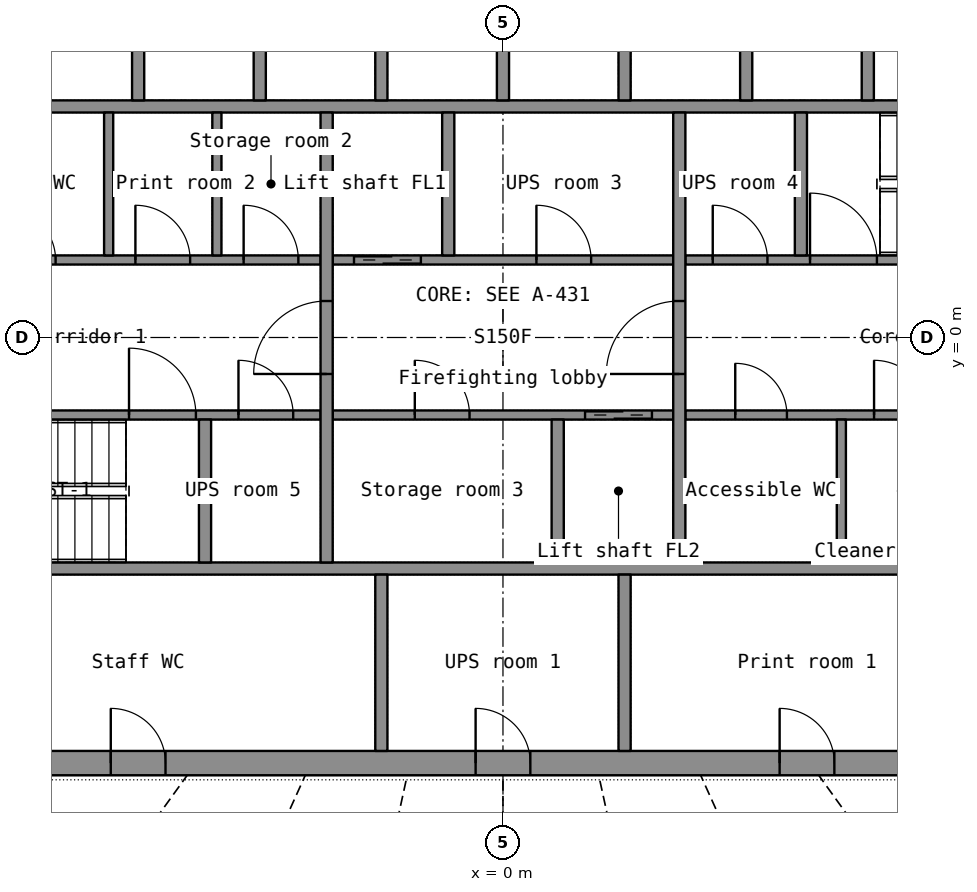
"""IFC4 building model, lengths in metres.
Left out: names, types, materials, properties, quantities, classifications, styles, units other than length and angle.
Written with IfcOpenShell. Run it as: python <this file> out.ifc"""

import sys

from ifc_helpers import new_model, si_unit, direction, frame, frame_2d, origin, place, context, subcontext, project, spatial, rectangle, extrude, element, fill, save


model = new_model("IFC4")
c1 = context("Model", 3, precision=1e-05, world=origin(), true_north=direction((0.0, 1.0)))
c2 = subcontext(c1, "Body", "Model", "MODEL_VIEW")
j1 = project(units=[si_unit("LENGTHUNIT", "METRE"), si_unit("PLANEANGLEUNIT", "RADIAN")], contexts=[c1])
p1 = place(None, origin())
s1 = spatial("IfcSite", under=j1, at=p1, CompositionType="ELEMENT")
p2 = place(p1, origin())
s2 = spatial("IfcBuilding", under=s1, at=p2, CompositionType="ELEMENT")
p3 = place(p2, frame((0.0, 0.0, 239.3)))
s3 = spatial("IfcBuildingStorey", under=s2, at=p3, CompositionType="ELEMENT", Elevation=239.3)
p4 = place(p3, frame((-11.6, -7.0, 0.0), z_axis=(0.0, 0.0, 1.0), x_axis=(1.0, 0.0, 0.0)))
e1 = element("IfcWall", 1, at=p4, inside=s3, PredefinedType="SHEAR", context=c2, shape_type="SweptSolid", body=[
    extrude(rectangle(XDim=23.2, YDim=0.4, at=frame_2d((11.6, 0.0))), origin(), (0.0, 0.0, 1.0), 3.3),
])
p5 = place(p4, frame((20.05, 0.0, 0.0)))
e2 = element("IfcOpeningElement", 2, at=p5, cuts=e1, PredefinedType="OPENING", context=c2, shape_type="SweptSolid", body=[
    extrude(rectangle(XDim=1.1, YDim=2.2, at=frame_2d((0.55, 1.1))), frame((0.0, 0.21, 0.0), z_axis=(0.0, -1.0, 0.0), x_axis=(1.0, 0.0, 0.0)), (0.0, 0.0, 1.0), 0.42),
])
p6 = place(p4, frame((5.15, 0.0, 0.0)))
e3 = element("IfcOpeningElement", 3, at=p6, cuts=e1, PredefinedType="OPENING", context=c2, shape_type="SweptSolid", body=[
    extrude(rectangle(XDim=0.9, YDim=2.1, at=frame_2d((0.45, 1.05))), frame((0.0, 0.21, 0.0), z_axis=(0.0, -1.0, 0.0), x_axis=(1.0, 0.0, 0.0)), (0.0, 0.0, 1.0), 0.42),
])
p7 = place(p4, frame((11.15, 0.0, 0.0)))
e4 = element("IfcOpeningElement", 4, at=p7, cuts=e1, PredefinedType="OPENING", context=c2, shape_type="SweptSolid", body=[
    extrude(rectangle(XDim=0.9, YDim=2.1, at=frame_2d((0.45, 1.05))), frame((0.0, 0.21, 0.0), z_axis=(0.0, -1.0, 0.0), x_axis=(1.0, 0.0, 0.0)), (0.0, 0.0, 1.0), 0.42),
])
p8 = place(p4, frame((16.15, 0.0, 0.0)))
e5 = element("IfcOpeningElement", 5, at=p8, cuts=e1, PredefinedType="OPENING", context=c2, shape_type="SweptSolid", body=[
    extrude(rectangle(XDim=0.9, YDim=2.1, at=frame_2d((0.45, 1.05))), frame((0.0, 0.21, 0.0), z_axis=(0.0, -1.0, 0.0), x_axis=(1.0, 0.0, 0.0)), (0.0, 0.0, 1.0), 0.42),
])
p9 = place(p4, frame((0.35, 0.0, 0.0)))
e6 = element("IfcOpeningElement", 6, at=p9, cuts=e1, PredefinedType="OPENING", context=c2, shape_type="SweptSolid", body=[
    extrude(rectangle(XDim=0.8, YDim=2.05, at=frame_2d((0.4, 1.025))), frame((0.0, 0.21, 0.0), z_axis=(0.0, -1.0, 0.0), x_axis=(1.0, 0.0, 0.0)), (0.0, 0.0, 1.0), 0.42),
])
p10 = place(p4, frame((22.05, 0.0, 0.0)))
e7 = element("IfcOpeningElement", 7, at=p10, cuts=e1, PredefinedType="OPENING", context=c2, shape_type="SweptSolid", body=[
    extrude(rectangle(XDim=0.8, YDim=2.05, at=frame_2d((0.4, 1.025))), frame((0.0, 0.21, 0.0), z_axis=(0.0, -1.0, 0.0), x_axis=(1.0, 0.0, 0.0)), (0.0, 0.0, 1.0), 0.42),
])
for number, where, z_axis, x_axis in (
    (8, (-11.6, -3.8, 0.0), (0.0, 0.0, 1.0), (1.0, 0.0, 0.0)),
    (9, (-11.6, 3.8, 0.0), (0.0, 0.0, 1.0), (1.0, 0.0, 0.0)),
):
    element("IfcWall", number, at=place(p3, frame(where, z_axis=z_axis, x_axis=x_axis)), inside=s3, PredefinedType="SHEAR", context=c2, shape_type="SweptSolid", body=[
        extrude(rectangle(XDim=23.2, YDim=0.2, at=frame_2d((11.6, 0.0))), origin(), (0.0, 0.0, 1.0), 3.3),
    ])
for number, where, z_axis, x_axis in (
    (10, (-2.0, -6.8, 0.0), (0.0, 0.0, 1.0), (0.0, 1.0, 0.0)),
    (11, (2.0, -6.8, 0.0), (0.0, 0.0, 1.0), (0.0, 1.0, 0.0)),
):
    element("IfcWall", number, at=place(p3, frame(where, z_axis=z_axis, x_axis=x_axis)), inside=s3, PredefinedType="PARTITIONING", context=c2, shape_type="SweptSolid", body=[
        extrude(rectangle(XDim=2.9, YDim=0.2, at=frame_2d((1.45, 0.0))), origin(), (0.0, 0.0, 1.0), 3.3),
    ])
for number, where, z_axis, x_axis in (
    (12, (-6.0, 3.9, 0.0), (0.0, 0.0, 1.0), (0.0, 1.0, 0.0)),
    (13, (-4.0, 3.9, 0.0), (0.0, 0.0, 1.0), (0.0, 1.0, 0.0)),
    (14, (-2.0, 3.9, 0.0), (0.0, 0.0, 1.0), (0.0, 1.0, 0.0)),
    (15, (0.0, 3.9, 0.0), (0.0, 0.0, 1.0), (0.0, 1.0, 0.0)),
    (16, (2.0, 3.9, 0.0), (0.0, 0.0, 1.0), (0.0, 1.0, 0.0)),
    (17, (4.0, 3.9, 0.0), (0.0, 0.0, 1.0), (0.0, 1.0, 0.0)),
    (18, (6.0, 3.9, 0.0), (0.0, 0.0, 1.0), (0.0, 1.0, 0.0)),
):
    element("IfcWall", number, at=place(p3, frame(where, z_axis=z_axis, x_axis=x_axis)), inside=s3, PredefinedType="SHEAR", context=c2, shape_type="SweptSolid", body=[
        extrude(rectangle(XDim=2.9, YDim=0.2, at=frame_2d((1.45, 0.0))), origin(), (0.0, 0.0, 1.0), 3.3),
    ])
p11 = place(p3, frame((-11.6, -1.275, 0.0), z_axis=(0.0, 0.0, 1.0), x_axis=(1.0, 0.0, 0.0)))
e19 = element("IfcWall", 19, at=p11, inside=s3, PredefinedType="SHEAR", context=c2, shape_type="SweptSolid", body=[
    extrude(rectangle(XDim=8.6, YDim=0.15, at=frame_2d((4.3, 0.0))), origin(), (0.0, 0.0, 1.0), 3.3),
])
p12 = place(p11, frame((5.45, 0.0, 0.0)))
e20 = element("IfcOpeningElement", 20, at=p12, cuts=e19, PredefinedType="OPENING", context=c2, shape_type="SweptSolid", body=[
    extrude(rectangle(XDim=1.1, YDim=2.15, at=frame_2d((0.55, 1.075))), frame((0.0, 0.085, 0.0), z_axis=(0.0, -1.0, 0.0), x_axis=(1.0, 0.0, 0.0)), (0.0, 0.0, 1.0), 0.17),
])
p13 = place(p11, frame((7.25, 0.0, 0.0)))
e21 = element("IfcOpeningElement", 21, at=p13, cuts=e19, PredefinedType="OPENING", context=c2, shape_type="SweptSolid", body=[
    extrude(rectangle(XDim=0.9, YDim=2.1, at=frame_2d((0.45, 1.05))), frame((0.0, 0.085, 0.0), z_axis=(0.0, -1.0, 0.0), x_axis=(1.0, 0.0, 0.0)), (0.0, 0.0, 1.0), 0.17),
])
p14 = place(p3, frame((-2.8, -1.275, 0.0), z_axis=(0.0, 0.0, 1.0), x_axis=(1.0, 0.0, 0.0)))
e22 = element("IfcWall", 22, at=p14, inside=s3, PredefinedType="SHEAR", context=c2, shape_type="SweptSolid", body=[
    extrude(rectangle(XDim=5.6, YDim=0.15, at=frame_2d((2.8, 0.0))), origin(), (0.0, 0.0, 1.0), 3.3),
])
p15 = place(p14, frame((4.15, 0.0, 0.0)))
e23 = element("IfcOpeningElement", 23, at=p15, cuts=e22, PredefinedType="OPENING", context=c2, shape_type="SweptSolid", body=[
    extrude(rectangle(XDim=1.1, YDim=2.2, at=frame_2d((0.55, 1.1))), frame((0.0, 0.085, 0.0), z_axis=(0.0, -1.0, 0.0), x_axis=(1.0, 0.0, 0.0)), (0.0, 0.0, 1.0), 0.17),
])
p16 = place(p14, frame((1.35, 0.0, 0.0)))
e24 = element("IfcOpeningElement", 24, at=p16, cuts=e22, PredefinedType="OPENING", context=c2, shape_type="SweptSolid", body=[
    extrude(rectangle(XDim=0.9, YDim=2.1, at=frame_2d((0.45, 1.05))), frame((0.0, 0.085, 0.0), z_axis=(0.0, -1.0, 0.0), x_axis=(1.0, 0.0, 0.0)), (0.0, 0.0, 1.0), 0.17),
])
p17 = place(p3, frame((3.0, -1.275, 0.0), z_axis=(0.0, 0.0, 1.0), x_axis=(1.0, 0.0, 0.0)))
e25 = element("IfcWall", 25, at=p17, inside=s3, PredefinedType="PARTITIONING", context=c2, shape_type="SweptSolid", body=[
    extrude(rectangle(XDim=8.6, YDim=0.15, at=frame_2d((4.3, 0.0))), origin(), (0.0, 0.0, 1.0), 3.3),
])
p18 = place(p17, frame((0.82, 0.0, 0.0)))
e26 = element("IfcOpeningElement", 26, at=p18, cuts=e25, PredefinedType="OPENING", context=c2, shape_type="SweptSolid", body=[
    extrude(rectangle(XDim=0.85, YDim=2.1, at=frame_2d((0.425, 1.05))), frame((0.0, 0.085, 0.0), z_axis=(0.0, -1.0, 0.0), x_axis=(1.0, 0.0, 0.0)), (0.0, 0.0, 1.0), 0.17),
])
p19 = place(p17, frame((3.103, 0.0, 0.0)))
e27 = element("IfcOpeningElement", 27, at=p19, cuts=e25, PredefinedType="OPENING", context=c2, shape_type="SweptSolid", body=[
    extrude(rectangle(XDim=0.9, YDim=2.1, at=frame_2d((0.45, 1.05))), frame((0.0, 0.085, 0.0), z_axis=(0.0, -1.0, 0.0), x_axis=(1.0, 0.0, 0.0)), (0.0, 0.0, 1.0), 0.17),
])
p20 = place(p17, frame((6.158, 0.0, 0.0)))
e28 = element("IfcOpeningElement", 28, at=p20, cuts=e25, PredefinedType="OPENING", context=c2, shape_type="SweptSolid", body=[
    extrude(rectangle(XDim=0.9, YDim=2.1, at=frame_2d((0.45, 1.05))), frame((0.0, 0.085, 0.0), z_axis=(0.0, -1.0, 0.0), x_axis=(1.0, 0.0, 0.0)), (0.0, 0.0, 1.0), 0.17),
])
p21 = place(p3, frame((-11.6, 1.275, 0.0), z_axis=(0.0, 0.0, 1.0), x_axis=(1.0, 0.0, 0.0)))
e29 = element("IfcWall", 29, at=p21, inside=s3, PredefinedType="PARTITIONING", context=c2, shape_type="SweptSolid", body=[
    extrude(rectangle(XDim=8.6, YDim=0.15, at=frame_2d((4.3, 0.0))), origin(), (0.0, 0.0, 1.0), 3.3),
])
p22 = place(p21, frame((0.798, 0.0, 0.0)))
e30 = element("IfcOpeningElement", 30, at=p22, cuts=e29, PredefinedType="OPENING", context=c2, shape_type="SweptSolid", body=[
    extrude(rectangle(XDim=0.85, YDim=2.1, at=frame_2d((0.425, 1.05))), frame((0.0, 0.085, 0.0), z_axis=(0.0, -1.0, 0.0), x_axis=(1.0, 0.0, 0.0)), (0.0, 0.0, 1.0), 0.17),
])
p23 = place(p21, frame((3.393, 0.0, 0.0)))
e31 = element("IfcOpeningElement", 31, at=p23, cuts=e29, PredefinedType="OPENING", context=c2, shape_type="SweptSolid", body=[
    extrude(rectangle(XDim=0.85, YDim=2.1, at=frame_2d((0.425, 1.05))), frame((0.0, 0.085, 0.0), z_axis=(0.0, -1.0, 0.0), x_axis=(1.0, 0.0, 0.0)), (0.0, 0.0, 1.0), 0.17),
])
p24 = place(p21, frame((5.555, 0.0, 0.0)))
e32 = element("IfcOpeningElement", 32, at=p24, cuts=e29, PredefinedType="OPENING", context=c2, shape_type="SweptSolid", body=[
    extrude(rectangle(XDim=0.9, YDim=2.1, at=frame_2d((0.45, 1.05))), frame((0.0, 0.085, 0.0), z_axis=(0.0, -1.0, 0.0), x_axis=(1.0, 0.0, 0.0)), (0.0, 0.0, 1.0), 0.17),
])
p25 = place(p21, frame((7.335, 0.0, 0.0)))
e33 = element("IfcOpeningElement", 33, at=p25, cuts=e29, PredefinedType="OPENING", context=c2, shape_type="SweptSolid", body=[
    extrude(rectangle(XDim=0.9, YDim=2.1, at=frame_2d((0.45, 1.05))), frame((0.0, 0.085, 0.0), z_axis=(0.0, -1.0, 0.0), x_axis=(1.0, 0.0, 0.0)), (0.0, 0.0, 1.0), 0.17),
])
p26 = place(p3, frame((-2.8, 1.275, 0.0), z_axis=(0.0, 0.0, 1.0), x_axis=(1.0, 0.0, 0.0)))
e34 = element("IfcWall", 34, at=p26, inside=s3, PredefinedType="SHEAR", context=c2, shape_type="SweptSolid", body=[
    extrude(rectangle(XDim=5.6, YDim=0.15, at=frame_2d((2.8, 0.0))), origin(), (0.0, 0.0, 1.0), 3.3),
])
p27 = place(p26, frame((0.35, 0.0, 0.0)))
e35 = element("IfcOpeningElement", 35, at=p27, cuts=e34, PredefinedType="OPENING", context=c2, shape_type="SweptSolid", body=[
    extrude(rectangle(XDim=1.1, YDim=2.2, at=frame_2d((0.55, 1.1))), frame((0.0, 0.085, 0.0), z_axis=(0.0, -1.0, 0.0), x_axis=(1.0, 0.0, 0.0)), (0.0, 0.0, 1.0), 0.17),
])
p28 = place(p26, frame((3.35, 0.0, 0.0)))
e36 = element("IfcOpeningElement", 36, at=p28, cuts=e34, PredefinedType="OPENING", context=c2, shape_type="SweptSolid", body=[
    extrude(rectangle(XDim=0.9, YDim=2.1, at=frame_2d((0.45, 1.05))), frame((0.0, 0.085, 0.0), z_axis=(0.0, -1.0, 0.0), x_axis=(1.0, 0.0, 0.0)), (0.0, 0.0, 1.0), 0.17),
])
p29 = place(p3, frame((3.0, 1.275, 0.0), z_axis=(0.0, 0.0, 1.0), x_axis=(1.0, 0.0, 0.0)))
e37 = element("IfcWall", 37, at=p29, inside=s3, PredefinedType="SHEAR", context=c2, shape_type="SweptSolid", body=[
    extrude(rectangle(XDim=8.6, YDim=0.15, at=frame_2d((4.3, 0.0))), origin(), (0.0, 0.0, 1.0), 3.3),
])
p30 = place(p29, frame((2.05, 0.0, 0.0)))
e38 = element("IfcOpeningElement", 38, at=p30, cuts=e37, PredefinedType="OPENING", context=c2, shape_type="SweptSolid", body=[
    extrude(rectangle(XDim=1.1, YDim=2.15, at=frame_2d((0.55, 1.075))), frame((0.0, 0.085, 0.0), z_axis=(0.0, -1.0, 0.0), x_axis=(1.0, 0.0, 0.0)), (0.0, 0.0, 1.0), 0.17),
])
p31 = place(p29, frame((0.45, 0.0, 0.0)))
e39 = element("IfcOpeningElement", 39, at=p31, cuts=e37, PredefinedType="OPENING", context=c2, shape_type="SweptSolid", body=[
    extrude(rectangle(XDim=0.9, YDim=2.1, at=frame_2d((0.45, 1.05))), frame((0.0, 0.085, 0.0), z_axis=(0.0, -1.0, 0.0), x_axis=(1.0, 0.0, 0.0)), (0.0, 0.0, 1.0), 0.17),
])
p32 = place(p3, frame((-2.9, -3.7, 0.0), z_axis=(0.0, 0.0, 1.0), x_axis=(0.0, 1.0, 0.0)))
e40 = element("IfcWall", 40, at=p32, inside=s3, PredefinedType="SHEAR", context=c2, shape_type="SweptSolid", body=[
    extrude(rectangle(XDim=7.4, YDim=0.2, at=frame_2d((3.7, 0.0))), origin(), (0.0, 0.0, 1.0), 3.3),
])
p33 = place(p32, frame((3.1, 0.0, 0.0)))
e41 = element("IfcOpeningElement", 41, at=p33, cuts=e40, PredefinedType="OPENING", context=c2, shape_type="SweptSolid", body=[
    extrude(rectangle(XDim=1.2, YDim=2.2, at=frame_2d((0.6, 1.1))), frame((0.0, 0.11, 0.0), z_axis=(0.0, -1.0, 0.0), x_axis=(1.0, 0.0, 0.0)), (0.0, 0.0, 1.0), 0.22),
])
p34 = place(p3, frame((2.9, -3.7, 0.0), z_axis=(0.0, 0.0, 1.0), x_axis=(0.0, 1.0, 0.0)))
e42 = element("IfcWall", 42, at=p34, inside=s3, PredefinedType="SHEAR", context=c2, shape_type="SweptSolid", body=[
    extrude(rectangle(XDim=7.4, YDim=0.2, at=frame_2d((3.7, 0.0))), origin(), (0.0, 0.0, 1.0), 3.3),
])
p35 = place(p34, frame((3.1, 0.0, 0.0)))
e43 = element("IfcOpeningElement", 43, at=p35, cuts=e42, PredefinedType="OPENING", context=c2, shape_type="SweptSolid", body=[
    extrude(rectangle(XDim=1.2, YDim=2.2, at=frame_2d((0.6, 1.1))), frame((0.0, 0.11, 0.0), z_axis=(0.0, -1.0, 0.0), x_axis=(1.0, 0.0, 0.0)), (0.0, 0.0, 1.0), 0.22),
])
for number, where, z_axis, x_axis in (
    (44, (-0.9, 1.35, 0.0), (0.0, 0.0, 1.0), (0.0, 1.0, 0.0)),
    (45, (0.9, -3.7, 0.0), (0.0, 0.0, 1.0), (0.0, 1.0, 0.0)),
    (46, (-4.9, -3.7, 0.0), (0.0, 0.0, 1.0), (0.0, 1.0, 0.0)),
    (47, (4.9, 1.35, 0.0), (0.0, 0.0, 1.0), (0.0, 1.0, 0.0)),
):
    element("IfcWall", number, at=place(p3, frame(where, z_axis=z_axis, x_axis=x_axis)), inside=s3, PredefinedType="SHEAR", context=c2, shape_type="SweptSolid", body=[
        extrude(rectangle(XDim=2.35, YDim=0.2, at=frame_2d((1.175, 0.0))), origin(), (0.0, 0.0, 1.0), 3.3),
    ])
for number, where, z_axis, x_axis in (
    (48, (-6.485, 1.35, 0.0), (0.0, 0.0, 1.0), (0.0, 1.0, 0.0)),
    (49, (-4.705, 1.35, 0.0), (0.0, 0.0, 1.0), (0.0, 1.0, 0.0)),
    (50, (5.565, -3.7, 0.0), (0.0, 0.0, 1.0), (0.0, 1.0, 0.0)),
):
    element("IfcWall", number, at=place(p3, frame(where, z_axis=z_axis, x_axis=x_axis)), inside=s3, PredefinedType="PARTITIONING", context=c2, shape_type="SweptSolid", body=[
        extrude(rectangle(XDim=2.35, YDim=0.15, at=frame_2d((1.175, 0.0))), origin(), (0.0, 0.0, 1.0), 3.3),
    ])
p36 = place(p6, origin())
e51 = element("IfcDoor", 51, at=p36, inside=s3, OperationType="SINGLE_SWING_LEFT", PredefinedType="DOOR", context=c2, shape_type="SweptSolid", body=[
    extrude(rectangle(XDim=0.9, YDim=2.1, at=frame_2d((0.45, 1.05))), frame((0.0, 0.025, 0.0), z_axis=(0.0, -1.0, 0.0), x_axis=(1.0, 0.0, 0.0)), (0.0, 0.0, 1.0), 0.05),
])
fill(e3, e51)
p37 = place(p7, origin())
e52 = element("IfcDoor", 52, at=p37, inside=s3, OperationType="SINGLE_SWING_LEFT", PredefinedType="DOOR", context=c2, shape_type="SweptSolid", body=[
    extrude(rectangle(XDim=0.9, YDim=2.1, at=frame_2d((0.45, 1.05))), frame((0.0, 0.025, 0.0), z_axis=(0.0, -1.0, 0.0), x_axis=(1.0, 0.0, 0.0)), (0.0, 0.0, 1.0), 0.05),
])
fill(e4, e52)
p38 = place(p8, origin())
e53 = element("IfcDoor", 53, at=p38, inside=s3, OperationType="SINGLE_SWING_LEFT", PredefinedType="DOOR", context=c2, shape_type="SweptSolid", body=[
    extrude(rectangle(XDim=0.9, YDim=2.1, at=frame_2d((0.45, 1.05))), frame((0.0, 0.025, 0.0), z_axis=(0.0, -1.0, 0.0), x_axis=(1.0, 0.0, 0.0)), (0.0, 0.0, 1.0), 0.05),
])
fill(e5, e53)
p39 = place(p33, origin())
e54 = element("IfcDoor", 54, at=p39, inside=s3, OperationType="SINGLE_SWING_LEFT", PredefinedType="DOOR", context=c2, shape_type="SweptSolid", body=[
    extrude(rectangle(XDim=1.2, YDim=2.2, at=frame_2d((0.6, 1.1))), frame((0.0, 0.025, 0.0), z_axis=(0.0, -1.0, 0.0), x_axis=(1.0, 0.0, 0.0)), (0.0, 0.0, 1.0), 0.05),
])
fill(e41, e54)
p40 = place(p35, origin())
e55 = element("IfcDoor", 55, at=p40, inside=s3, OperationType="SINGLE_SWING_LEFT", PredefinedType="DOOR", context=c2, shape_type="SweptSolid", body=[
    extrude(rectangle(XDim=1.2, YDim=2.2, at=frame_2d((0.6, 1.1))), frame((0.0, 0.025, 0.0), z_axis=(0.0, -1.0, 0.0), x_axis=(1.0, 0.0, 0.0)), (0.0, 0.0, 1.0), 0.05),
])
fill(e43, e55)
p41 = place(p27, origin())
e56 = element("IfcDoor", 56, at=p41, inside=s3, OperationType="DOUBLE_DOOR_SLIDING", PredefinedType="DOOR", context=c2, shape_type="SweptSolid", body=[
    extrude(rectangle(XDim=1.1, YDim=2.2, at=frame_2d((0.55, 1.1))), frame((0.0, 0.025, 0.0), z_axis=(0.0, -1.0, 0.0), x_axis=(1.0, 0.0, 0.0)), (0.0, 0.0, 1.0), 0.05),
])
fill(e35, e56)
p42 = place(p15, origin())
e57 = element("IfcDoor", 57, at=p42, inside=s3, OperationType="DOUBLE_DOOR_SLIDING", PredefinedType="DOOR", context=c2, shape_type="SweptSolid", body=[
    extrude(rectangle(XDim=1.1, YDim=2.2, at=frame_2d((0.55, 1.1))), frame((0.0, 0.025, 0.0), z_axis=(0.0, -1.0, 0.0), x_axis=(1.0, 0.0, 0.0)), (0.0, 0.0, 1.0), 0.05),
])
fill(e23, e57)
p43 = place(p12, origin())
e58 = element("IfcDoor", 58, at=p43, inside=s3, OperationType="SINGLE_SWING_LEFT", PredefinedType="DOOR", context=c2, shape_type="SweptSolid", body=[
    extrude(rectangle(XDim=1.1, YDim=2.15, at=frame_2d((0.55, 1.075))), frame((0.0, 0.025, 0.0), z_axis=(0.0, -1.0, 0.0), x_axis=(1.0, 0.0, 0.0)), (0.0, 0.0, 1.0), 0.05),
])
fill(e20, e58)
p44 = place(p30, origin())
e59 = element("IfcDoor", 59, at=p44, inside=s3, OperationType="SINGLE_SWING_LEFT", PredefinedType="DOOR", context=c2, shape_type="SweptSolid", body=[
    extrude(rectangle(XDim=1.1, YDim=2.15, at=frame_2d((0.55, 1.075))), frame((0.0, 0.025, 0.0), z_axis=(0.0, -1.0, 0.0), x_axis=(1.0, 0.0, 0.0)), (0.0, 0.0, 1.0), 0.05),
])
fill(e38, e59)
p45 = place(p23, origin())
e60 = element("IfcDoor", 60, at=p45, inside=s3, OperationType="SINGLE_SWING_LEFT", PredefinedType="DOOR", context=c2, shape_type="SweptSolid", body=[
    extrude(rectangle(XDim=0.85, YDim=2.1, at=frame_2d((0.425, 1.05))), frame((0.0, 0.025, 0.0), z_axis=(0.0, -1.0, 0.0), x_axis=(1.0, 0.0, 0.0)), (0.0, 0.0, 1.0), 0.05),
])
fill(e31, e60)
p46 = place(p24, origin())
e61 = element("IfcDoor", 61, at=p46, inside=s3, OperationType="SINGLE_SWING_LEFT", PredefinedType="DOOR", context=c2, shape_type="SweptSolid", body=[
    extrude(rectangle(XDim=0.9, YDim=2.1, at=frame_2d((0.45, 1.05))), frame((0.0, 0.025, 0.0), z_axis=(0.0, -1.0, 0.0), x_axis=(1.0, 0.0, 0.0)), (0.0, 0.0, 1.0), 0.05),
])
fill(e32, e61)
p47 = place(p25, origin())
e62 = element("IfcDoor", 62, at=p47, inside=s3, OperationType="SINGLE_SWING_LEFT", PredefinedType="DOOR", context=c2, shape_type="SweptSolid", body=[
    extrude(rectangle(XDim=0.9, YDim=2.1, at=frame_2d((0.45, 1.05))), frame((0.0, 0.025, 0.0), z_axis=(0.0, -1.0, 0.0), x_axis=(1.0, 0.0, 0.0)), (0.0, 0.0, 1.0), 0.05),
])
fill(e33, e62)
p48 = place(p18, origin())
e63 = element("IfcDoor", 63, at=p48, inside=s3, OperationType="SINGLE_SWING_LEFT", PredefinedType="DOOR", context=c2, shape_type="SweptSolid", body=[
    extrude(rectangle(XDim=0.85, YDim=2.1, at=frame_2d((0.425, 1.05))), frame((0.0, 0.025, 0.0), z_axis=(0.0, -1.0, 0.0), x_axis=(1.0, 0.0, 0.0)), (0.0, 0.0, 1.0), 0.05),
])
fill(e26, e63)
p49 = place(p19, origin())
e64 = element("IfcDoor", 64, at=p49, inside=s3, OperationType="SINGLE_SWING_LEFT", PredefinedType="DOOR", context=c2, shape_type="SweptSolid", body=[
    extrude(rectangle(XDim=0.9, YDim=2.1, at=frame_2d((0.45, 1.05))), frame((0.0, 0.025, 0.0), z_axis=(0.0, -1.0, 0.0), x_axis=(1.0, 0.0, 0.0)), (0.0, 0.0, 1.0), 0.05),
])
fill(e27, e64)
p50 = place(p28, origin())
e65 = element("IfcDoor", 65, at=p50, inside=s3, OperationType="SINGLE_SWING_LEFT", PredefinedType="DOOR", context=c2, shape_type="SweptSolid", body=[
    extrude(rectangle(XDim=0.9, YDim=2.1, at=frame_2d((0.45, 1.05))), frame((0.0, 0.025, 0.0), z_axis=(0.0, -1.0, 0.0), x_axis=(1.0, 0.0, 0.0)), (0.0, 0.0, 1.0), 0.05),
])
fill(e36, e65)
p51 = place(p16, origin())
e66 = element("IfcDoor", 66, at=p51, inside=s3, OperationType="SINGLE_SWING_LEFT", PredefinedType="DOOR", context=c2, shape_type="SweptSolid", body=[
    extrude(rectangle(XDim=0.9, YDim=2.1, at=frame_2d((0.45, 1.05))), frame((0.0, 0.025, 0.0), z_axis=(0.0, -1.0, 0.0), x_axis=(1.0, 0.0, 0.0)), (0.0, 0.0, 1.0), 0.05),
])
fill(e24, e66)
p52 = place(p31, origin())
e67 = element("IfcDoor", 67, at=p52, inside=s3, OperationType="SINGLE_SWING_LEFT", PredefinedType="DOOR", context=c2, shape_type="SweptSolid", body=[
    extrude(rectangle(XDim=0.9, YDim=2.1, at=frame_2d((0.45, 1.05))), frame((0.0, 0.025, 0.0), z_axis=(0.0, -1.0, 0.0), x_axis=(1.0, 0.0, 0.0)), (0.0, 0.0, 1.0), 0.05),
])
fill(e39, e67)
p53 = place(p13, origin())
e68 = element("IfcDoor", 68, at=p53, inside=s3, OperationType="SINGLE_SWING_LEFT", PredefinedType="DOOR", context=c2, shape_type="SweptSolid", body=[
    extrude(rectangle(XDim=0.9, YDim=2.1, at=frame_2d((0.45, 1.05))), frame((0.0, 0.025, 0.0), z_axis=(0.0, -1.0, 0.0), x_axis=(1.0, 0.0, 0.0)), (0.0, 0.0, 1.0), 0.05),
])
fill(e21, e68)
save(model, sys.argv[1])
